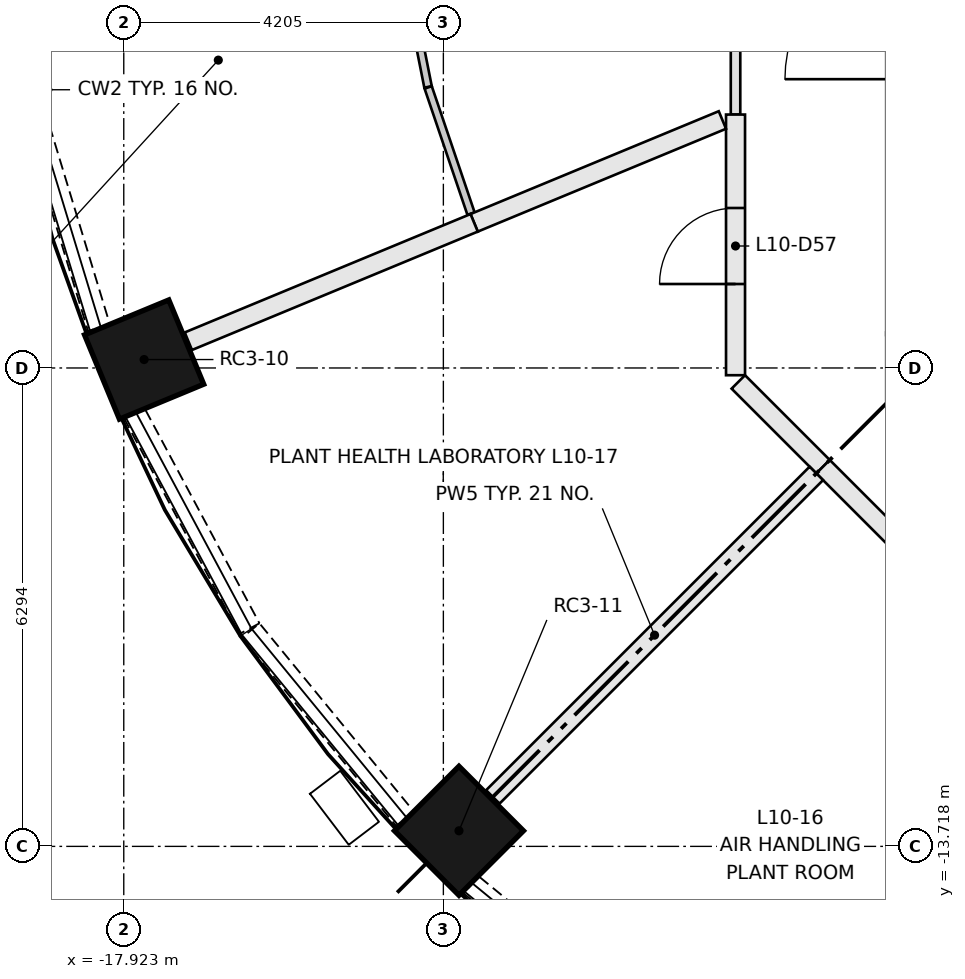
"""IFC4 building model, lengths in metres.
Left out: names, types, materials, properties, quantities, classifications, styles, units other than length and angle.
Written with IfcOpenShell. Run it as: python <this file> out.ifc"""

import sys

from ifc_helpers import new_model, si_unit, direction, frame, frame_2d, origin, origin_2d, place, context, subcontext, project, spatial, rectangle, extrude, element, fill, save


model = new_model("IFC4")
c1 = context("Model", 3, precision=1e-05, world=origin(), true_north=direction((0.0, 1.0)))
c2 = subcontext(c1, "Body", "Model", "MODEL_VIEW")
j1 = project(units=[si_unit("LENGTHUNIT", "METRE"), si_unit("PLANEANGLEUNIT", "RADIAN")], contexts=[c1])
p1 = place(None, origin())
s1 = spatial("IfcSite", under=j1, at=p1, CompositionType="ELEMENT")
p2 = place(p1, origin())
s2 = spatial("IfcBuilding", under=s1, at=p2, CompositionType="ELEMENT")
p3 = place(p2, frame((0.0, 0.0, 40.8)))
s3 = spatial("IfcBuildingStorey", under=s2, at=p3, CompositionType="ELEMENT", Elevation=40.8)
for number, where, z_axis, x_axis in (
    (1, (-17.655, -7.313, 0.0), (0.0, 0.0, 1.0), (-0.924, -0.383, 0.0)),
    (2, (-13.513, -13.513, 0.0), (0.0, 0.0, 1.0), (-0.707, -0.707, 0.0)),
):
    element("IfcColumn", number, at=place(p3, frame(where, z_axis=z_axis, x_axis=x_axis)), inside=s3, PredefinedType="COLUMN", context=c2, shape_type="SweptSolid", body=[
        extrude(rectangle(XDim=1.2, YDim=1.2, at=origin_2d()), origin(), (0.0, 0.0, 1.0), 3.65),
    ])
p4 = place(p3, frame((-19.18, -3.83, 0.0), z_axis=(0.0, 0.0, 1.0), x_axis=(0.290472877795, -0.956883225512, 0.0)))
e3 = element("IfcWall", 3, at=p4, inside=s3, PredefinedType="SOLIDWALL", context=c2, shape_type="SweptSolid", body=[
    extrude(rectangle(XDim=3.202, YDim=0.3, at=frame_2d((1.601, 0.0))), origin(), (0.0, 0.0, 1.0), 0.9),
])
p5 = place(p3, frame((-17.78, -8.028, 0.0), z_axis=(0.0, 0.0, 1.0), x_axis=(0.471284265614, -0.881981372243, 0.0)))
e4 = element("IfcWall", 4, at=p5, inside=s3, PredefinedType="SOLIDWALL", context=c2, shape_type="SweptSolid", body=[
    extrude(rectangle(XDim=3.204, YDim=0.3, at=frame_2d((1.602, 0.0))), origin(), (0.0, 0.0, 1.0), 0.9),
])
for number, where, z_axis, x_axis in (
    (5, (-16.253, -10.879, 0.0), (0.0, 0.0, 1.0), (0.634, -0.773, 0.0)),
    (6, (-13.354, -14.222, 0.0), (0.0, 0.0, 1.0), (0.773, -0.634, 0.0)),
):
    element("IfcWall", number, at=place(p3, frame(where, z_axis=z_axis, x_axis=x_axis)), inside=s3, PredefinedType="SOLIDWALL", context=c2, shape_type="SweptSolid", body=[
        extrude(rectangle(XDim=3.202, YDim=0.3, at=frame_2d((1.601, 0.0))), origin(), (0.0, 0.0, 1.0), 0.9),
    ])
p6 = place(p3, frame((-9.874, -4.09, 0.0), z_axis=(0.0, 0.0, 1.0), x_axis=(0.0, 1.0, 0.0)))
e7 = element("IfcWall", 7, at=p6, inside=s3, PredefinedType="PARTITIONING", context=c2, shape_type="SweptSolid", body=[
    extrude(rectangle(XDim=8.18, YDim=0.125, at=frame_2d((4.09, 0.0))), origin(), (0.0, 0.0, 1.0), 3.3),
])
p7 = place(p6, frame((3.6, 0.0, 0.0)))
e8 = element("IfcOpeningElement", 8, at=p7, cuts=e7, PredefinedType="OPENING", context=c2, shape_type="SweptSolid", body=[
    extrude(rectangle(XDim=1.0, YDim=2.1, at=frame_2d((0.5, 1.05))), frame((0.0, 0.073, 0.0), z_axis=(0.0, -1.0, 0.0), x_axis=(1.0, 0.0, 0.0)), (0.0, 0.0, 1.0), 0.145),
])
p8 = place(p3, frame((-9.874, -7.519, 0.0), z_axis=(0.0, 0.0, 1.0), x_axis=(0.0, 1.0, 0.0)))
e9 = element("IfcWall", 9, at=p8, inside=s3, PredefinedType="PARTITIONING", context=c2, shape_type="SweptSolid", body=[
    extrude(rectangle(XDim=3.429, YDim=0.25, at=frame_2d((1.715, 0.0))), origin(), (0.0, 0.0, 1.0), 3.3),
])
p9 = place(p8, frame((1.2, 0.0, 0.0)))
e10 = element("IfcOpeningElement", 10, at=p9, cuts=e9, PredefinedType="OPENING", context=c2, shape_type="SweptSolid", body=[
    extrude(rectangle(XDim=1.0, YDim=2.1, at=frame_2d((0.5, 1.05))), frame((0.0, 0.135, 0.0), z_axis=(0.0, -1.0, 0.0), x_axis=(1.0, 0.0, 0.0)), (0.0, 0.0, 1.0), 0.27),
])
for number, where, z_axis, x_axis in (
    (11, (-8.722, -8.722, 0.0), (0.0, 0.0, 1.0), (-0.707, 0.707, 0.0)),
    (12, (-7.608, -9.837, 0.0), (0.0, 0.0, 1.0), (-0.707, 0.707, 0.0)),
):
    element("IfcWall", number, at=place(p3, frame(where, z_axis=z_axis, x_axis=x_axis)), inside=s3, PredefinedType="PARTITIONING", context=c2, shape_type="SweptSolid", body=[
        extrude(rectangle(XDim=1.577, YDim=0.25, at=frame_2d((0.788, 0.0))), origin(), (0.0, 0.0, 1.0), 3.3),
    ])
p10 = place(p3, frame((-13.92, -3.726, 0.0), z_axis=(0.0, 0.0, 1.0), x_axis=(-0.195091231684, 0.980785099459, 0.0)))
e13 = element("IfcWall", 13, at=p10, inside=s3, PredefinedType="PARTITIONING", context=c2, shape_type="SweptSolid", body=[
    extrude(rectangle(XDim=1.878, YDim=0.1, at=frame_2d((0.939, 0.0))), origin(), (0.0, 0.0, 1.0), 3.3),
])
p11 = place(p3, frame((-13.354, -5.393, 0.0), z_axis=(0.0, 0.0, 1.0), x_axis=(-0.321445771201, 0.946927988908, 0.0)))
e14 = element("IfcWall", 14, at=p11, inside=s3, PredefinedType="PARTITIONING", context=c2, shape_type="SweptSolid", body=[
    extrude(rectangle(XDim=1.753, YDim=0.1, at=frame_2d((0.876, 0.0))), origin(), (0.0, 0.0, 1.0), 3.3),
])
p12 = place(p3, frame((-10.047, -4.162, 0.0), z_axis=(0.0, 0.0, 1.0), x_axis=(-0.92388805455, -0.382662857696, 0.0)))
e15 = element("IfcWall", 15, at=p12, inside=s3, PredefinedType="PARTITIONING", context=c2, shape_type="SweptSolid", body=[
    extrude(rectangle(XDim=3.535, YDim=0.25, at=frame_2d((1.768, 0.0))), origin(), (0.0, 0.0, 1.0), 3.3),
])
p13 = place(p3, frame((-13.313, -5.514, 0.0), z_axis=(0.0, 0.0, 1.0), x_axis=(-0.923873536763, -0.382697907061, 0.0)))
e16 = element("IfcWall", 16, at=p13, inside=s3, PredefinedType="PARTITIONING", context=c2, shape_type="SweptSolid", body=[
    extrude(rectangle(XDim=4.07, YDim=0.25, at=frame_2d((2.035, 0.0))), origin(), (0.0, 0.0, 1.0), 3.3),
])
p14 = place(p3, frame((-13.067, -13.067, 0.0), z_axis=(0.0, 0.0, 1.0), x_axis=(0.707106781187, 0.707106781187, 0.0)))
e17 = element("IfcWall", 17, at=p14, inside=s3, PredefinedType="PARTITIONING", context=c2, shape_type="SweptSolid", body=[
    extrude(rectangle(XDim=6.02, YDim=0.25, at=frame_2d((3.01, 0.0))), origin(), (0.0, 0.0, 1.0), 3.3),
])
p15 = place(p9, origin())
e18 = element("IfcDoor", 18, at=p15, inside=s3, OperationType="SINGLE_SWING_LEFT", PredefinedType="DOOR", context=c2, shape_type="SweptSolid", body=[
    extrude(rectangle(XDim=1.0, YDim=2.1, at=frame_2d((0.5, 1.05))), frame((0.0, 0.025, 0.0), z_axis=(0.0, -1.0, 0.0), x_axis=(1.0, 0.0, 0.0)), (0.0, 0.0, 1.0), 0.05),
])
fill(e10, e18)
save(model, sys.argv[1])
